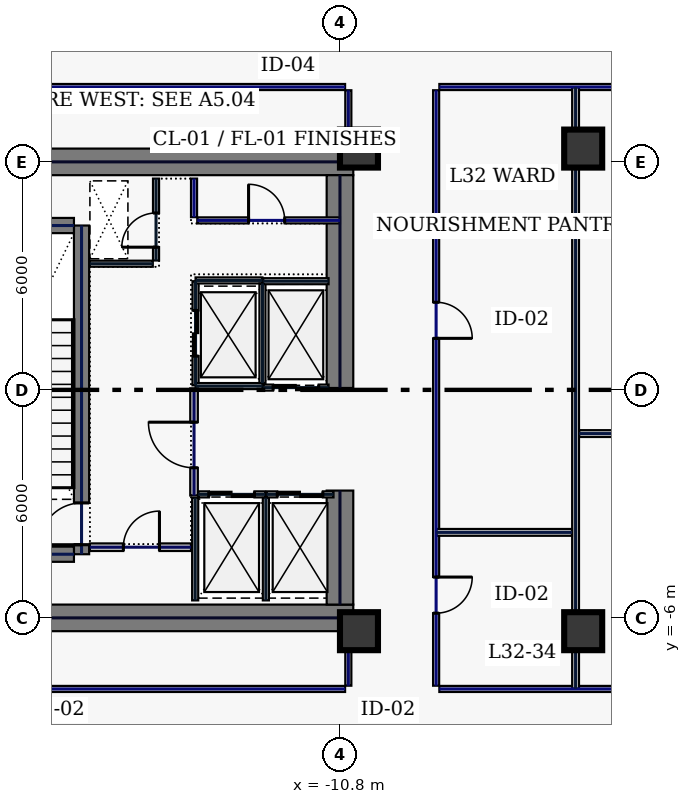
"""IFC4 building model, lengths in metres.
Left out: names, types, materials, properties, quantities, classifications, styles, units other than length and angle.
Written with IfcOpenShell. Run it as: python <this file> out.ifc"""

import sys

from ifc_helpers import new_model, si_unit, direction, frame, frame_2d, origin, origin_2d, place, context, subcontext, project, spatial, rectangle, hollow_rectangle, extrude, element, fill, save


model = new_model("IFC4")
c1 = context("Model", 3, precision=1e-05, world=origin(), true_north=direction((0.0, 1.0)))
c2 = subcontext(c1, "Body", "Model", "MODEL_VIEW")
j1 = project(units=[si_unit("LENGTHUNIT", "METRE"), si_unit("PLANEANGLEUNIT", "RADIAN")], contexts=[c1])
p1 = place(None, origin())
s1 = spatial("IfcSite", under=j1, at=p1, CompositionType="ELEMENT")
p2 = place(p1, origin())
s2 = spatial("IfcBuilding", under=s1, at=p2, CompositionType="ELEMENT")
p3 = place(p2, frame((0.0, 0.0, 141.4)))
s3 = spatial("IfcBuildingStorey", under=s2, at=p3, CompositionType="ELEMENT", Elevation=141.4)
for number, where, z_axis, x_axis in (
    (1, (-22.0, 6.0, 0.0), (0.0, 0.0, 1.0), (1.0, 0.0, 0.0)),
    (2, (-22.0, -6.0, 0.0), (0.0, 0.0, 1.0), (1.0, 0.0, 0.0)),
):
    element("IfcWall", number, at=place(p3, frame(where, z_axis=z_axis, x_axis=x_axis)), inside=s3, PredefinedType="SHEAR", context=c2, shape_type="SweptSolid", body=[
        extrude(rectangle(XDim=11.55, YDim=0.7, at=frame_2d((5.775, 0.0))), origin(), (0.0, 0.0, 1.0), 4.48),
    ])
p4 = place(p3, frame((-10.8, -5.65, 0.0), z_axis=(0.0, 0.0, 1.0), x_axis=(0.0, 1.0, 0.0)))
e3 = element("IfcWall", 3, at=p4, inside=s3, PredefinedType="SHEAR", context=c2, shape_type="SweptSolid", body=[
    extrude(rectangle(XDim=3.0, YDim=0.7, at=frame_2d((1.5, 0.0))), origin(), (0.0, 0.0, 1.0), 4.48),
])
p5 = place(p3, frame((-10.8, 0.05, 0.0), z_axis=(0.0, 0.0, 1.0), x_axis=(0.0, 1.0, 0.0)))
e4 = element("IfcWall", 4, at=p5, inside=s3, PredefinedType="SHEAR", context=c2, shape_type="SweptSolid", body=[
    extrude(rectangle(XDim=5.6, YDim=0.7, at=frame_2d((2.8, 0.0))), origin(), (0.0, 0.0, 1.0), 4.48),
])
p6 = place(p3, frame((-17.6, -4.325, 0.0), z_axis=(0.0, 0.0, 1.0), x_axis=(0.0, 1.0, 0.0)))
e5 = element("IfcWall", 5, at=p6, inside=s3, PredefinedType="SHEAR", context=c2, shape_type="SweptSolid", body=[
    extrude(rectangle(XDim=8.65, YDim=0.4, at=frame_2d((4.325, 0.0))), origin(), (0.0, 0.0, 1.0), 4.48),
])
p7 = place(p6, frame((0.25, 0.0, 0.0)))
e6 = element("IfcOpeningElement", 6, at=p7, cuts=e5, PredefinedType="OPENING", context=c2, shape_type="SweptSolid", body=[
    extrude(rectangle(XDim=1.1, YDim=2.2, at=frame_2d((0.55, 1.1))), frame((0.0, 0.21, 0.0), z_axis=(0.0, -1.0, 0.0), x_axis=(1.0, 0.0, 0.0)), (0.0, 0.0, 1.0), 0.42),
])
for number, where, z_axis, x_axis in (
    (7, (-21.2, -4.325, 0.0), (0.0, 0.0, 1.0), (1.0, 0.0, 0.0)),
    (8, (-21.2, 4.325, 0.0), (0.0, 0.0, 1.0), (1.0, 0.0, 0.0)),
):
    element("IfcWall", number, at=place(p3, frame(where, z_axis=z_axis, x_axis=x_axis)), inside=s3, PredefinedType="SHEAR", context=c2, shape_type="SweptSolid", body=[
        extrude(rectangle(XDim=3.4, YDim=0.4, at=frame_2d((1.7, 0.0))), origin(), (0.0, 0.0, 1.0), 4.48),
    ])
for number, where, z_axis, x_axis in (
    (9, (-10.3, -6.35, 0.0), (0.0, 0.0, 1.0), (1.0, 0.0, 0.0)),
    (10, (-10.3, 6.35, 0.0), (0.0, 0.0, 1.0), (1.0, 0.0, 0.0)),
    (11, (-4.4, -6.35, 0.0), (0.0, 0.0, 1.0), (1.0, 0.0, 0.0)),
    (12, (-4.4, 6.35, 0.0), (0.0, 0.0, 1.0), (1.0, 0.0, 0.0)),
):
    element("IfcColumn", number, at=place(p3, frame(where, z_axis=z_axis, x_axis=x_axis)), inside=s3, PredefinedType="COLUMN", context=c2, shape_type="SweptSolid", body=[
        extrude(hollow_rectangle(XDim=1.0, YDim=1.0, WallThickness=0.045, at=origin_2d()), origin(), (0.0, 0.0, 1.0), 4.48),
    ])
p8 = place(p3, frame((-14.6, 0.12, 0.0), z_axis=(0.0, 0.0, 1.0), x_axis=(0.0, 1.0, 0.0)))
e13 = element("IfcWall", 13, at=p8, inside=s3, PredefinedType="PARTITIONING", context=c2, shape_type="SweptSolid", body=[
    extrude(rectangle(XDim=2.74, YDim=0.16, at=frame_2d((1.37, 0.0))), origin(), (0.0, 0.0, 1.0), 4.48),
])
p9 = place(p8, frame((0.77, 0.0, 0.0)))
e14 = element("IfcOpeningElement", 14, at=p9, cuts=e13, PredefinedType="OPENING", context=c2, shape_type="SweptSolid", body=[
    extrude(rectangle(XDim=1.2, YDim=2.2, at=frame_2d((0.6, 1.1))), frame((0.0, 0.09, 0.0), z_axis=(0.0, -1.0, 0.0), x_axis=(1.0, 0.0, 0.0)), (0.0, 0.0, 1.0), 0.18),
])
for number, where, z_axis, x_axis in (
    (15, (-14.6, 0.1, 0.0), (0.0, 0.0, 1.0), (1.0, 0.0, 0.0)),
    (16, (-14.6, 2.88, 0.0), (0.0, 0.0, 1.0), (1.0, 0.0, 0.0)),
):
    element("IfcWall", number, at=place(p3, frame(where, z_axis=z_axis, x_axis=x_axis)), inside=s3, PredefinedType="PARTITIONING", context=c2, shape_type="SweptSolid", body=[
        extrude(rectangle(XDim=1.76, YDim=0.16, at=frame_2d((0.88, 0.0))), origin(), (0.0, 0.0, 1.0), 4.48),
    ])
p10 = place(p3, frame((-12.84, 0.18, 0.0), z_axis=(0.0, 0.0, 1.0), x_axis=(0.0, 1.0, 0.0)))
e17 = element("IfcWall", 17, at=p10, inside=s3, PredefinedType="PARTITIONING", context=c2, shape_type="SweptSolid", body=[
    extrude(rectangle(XDim=2.62, YDim=0.16, at=frame_2d((1.31, 0.0))), origin(), (0.0, 0.0, 1.0), 4.48),
])
p11 = place(p3, frame((-14.53, -2.75, 0.0), z_axis=(0.0, 0.0, 1.0), x_axis=(1.0, 0.0, 0.0)))
e18 = element("IfcWall", 18, at=p11, inside=s3, PredefinedType="PARTITIONING", context=c2, shape_type="SweptSolid", body=[
    extrude(rectangle(XDim=1.76, YDim=0.16, at=frame_2d((0.88, 0.0))), origin(), (0.0, 0.0, 1.0), 4.48),
])
p12 = place(p11, frame((0.28, 0.0, 0.0)))
e19 = element("IfcOpeningElement", 19, at=p12, cuts=e18, PredefinedType="OPENING", context=c2, shape_type="SweptSolid", body=[
    extrude(rectangle(XDim=1.2, YDim=2.2, at=frame_2d((0.6, 1.1))), frame((0.0, 0.09, 0.0), z_axis=(0.0, -1.0, 0.0), x_axis=(1.0, 0.0, 0.0)), (0.0, 0.0, 1.0), 0.18),
])
for number, where, z_axis, x_axis in (
    (20, (-12.75, -5.54, 0.0), (0.0, 0.0, 1.0), (0.0, 1.0, 0.0)),
    (21, (-14.61, -5.54, 0.0), (0.0, 0.0, 1.0), (0.0, 1.0, 0.0)),
):
    element("IfcWall", number, at=place(p3, frame(where, z_axis=z_axis, x_axis=x_axis)), inside=s3, PredefinedType="PARTITIONING", context=c2, shape_type="SweptSolid", body=[
        extrude(rectangle(XDim=2.7, YDim=0.16, at=frame_2d((1.35, 0.0))), origin(), (0.0, 0.0, 1.0), 4.48),
    ])
p13 = place(p3, frame((-12.73, -2.75, 0.0), z_axis=(0.0, 0.0, 1.0), x_axis=(1.0, 0.0, 0.0)))
e22 = element("IfcWall", 22, at=p13, inside=s3, PredefinedType="PARTITIONING", context=c2, shape_type="SweptSolid", body=[
    extrude(rectangle(XDim=1.76, YDim=0.16, at=frame_2d((0.88, 0.0))), origin(), (0.0, 0.0, 1.0), 4.48),
])
p14 = place(p13, frame((0.28, 0.0, 0.0)))
e23 = element("IfcOpeningElement", 23, at=p14, cuts=e22, PredefinedType="OPENING", context=c2, shape_type="SweptSolid", body=[
    extrude(rectangle(XDim=1.2, YDim=2.2, at=frame_2d((0.6, 1.1))), frame((0.0, 0.09, 0.0), z_axis=(0.0, -1.0, 0.0), x_axis=(1.0, 0.0, 0.0)), (0.0, 0.0, 1.0), 0.18),
])
p15 = place(p3, frame((-12.82, 0.06, 0.0), z_axis=(0.0, 0.0, 1.0), x_axis=(1.0, 0.0, 0.0)))
e24 = element("IfcWall", 24, at=p15, inside=s3, PredefinedType="PARTITIONING", context=c2, shape_type="SweptSolid", body=[
    extrude(rectangle(XDim=1.72, YDim=0.16, at=frame_2d((0.86, 0.0))), origin(), (0.0, 0.0, 1.0), 4.48),
])
p16 = place(p15, frame((0.26, 0.0, 0.0)))
e25 = element("IfcOpeningElement", 25, at=p16, cuts=e24, PredefinedType="OPENING", context=c2, shape_type="SweptSolid", body=[
    extrude(rectangle(XDim=1.2, YDim=2.2, at=frame_2d((0.6, 1.1))), frame((0.0, 0.09, 0.0), z_axis=(0.0, -1.0, 0.0), x_axis=(1.0, 0.0, 0.0)), (0.0, 0.0, 1.0), 0.18),
])
p17 = place(p3, frame((-12.82, 2.86, 0.0), z_axis=(0.0, 0.0, 1.0), x_axis=(1.0, 0.0, 0.0)))
e26 = element("IfcWall", 26, at=p17, inside=s3, PredefinedType="PARTITIONING", context=c2, shape_type="SweptSolid", body=[
    extrude(rectangle(XDim=1.72, YDim=0.16, at=frame_2d((0.86, 0.0))), origin(), (0.0, 0.0, 1.0), 4.48),
])
p18 = place(p3, frame((-15.64, 3.405, 0.0), z_axis=(0.0, 0.0, 1.0), x_axis=(0.0, 1.0, 0.0)))
e27 = element("IfcWall", 27, at=p18, inside=s3, PredefinedType="PARTITIONING", context=c2, shape_type="SweptSolid", body=[
    extrude(rectangle(XDim=2.155, YDim=0.16, at=frame_2d((1.078, 0.0))), origin(), (0.0, 0.0, 1.0), 4.48),
])
p19 = place(p18, frame((0.35, 0.0, 0.0)))
e28 = element("IfcOpeningElement", 28, at=p19, cuts=e27, PredefinedType="OPENING", context=c2, shape_type="SweptSolid", body=[
    extrude(rectangle(XDim=0.9, YDim=2.2, at=frame_2d((0.45, 1.1))), frame((0.0, 0.09, 0.0), z_axis=(0.0, -1.0, 0.0), x_axis=(1.0, 0.0, 0.0)), (0.0, 0.0, 1.0), 0.18),
])
p20 = place(p3, frame((-17.38, 3.32, 0.0), z_axis=(0.0, 0.0, 1.0), x_axis=(1.0, 0.0, 0.0)))
e29 = element("IfcWall", 29, at=p20, inside=s3, PredefinedType="PARTITIONING", context=c2, shape_type="SweptSolid", body=[
    extrude(rectangle(XDim=1.655, YDim=0.16, at=frame_2d((0.827, 0.0))), origin(), (0.0, 0.0, 1.0), 4.48),
])
p21 = place(p3, frame((-17.38, -4.14, 0.0), z_axis=(0.0, 0.0, 1.0), x_axis=(1.0, 0.0, 0.0)))
e30 = element("IfcWall", 30, at=p21, inside=s3, PredefinedType="SOLIDWALL", context=c2, shape_type="SweptSolid", body=[
    extrude(rectangle(XDim=2.66, YDim=0.2, at=frame_2d((1.33, 0.0))), origin(), (0.0, 0.0, 1.0), 4.48),
])
p22 = place(p21, frame((0.88, 0.0, 0.0)))
e31 = element("IfcOpeningElement", 31, at=p22, cuts=e30, PredefinedType="OPENING", context=c2, shape_type="SweptSolid", body=[
    extrude(rectangle(XDim=0.95, YDim=2.2, at=frame_2d((0.475, 1.1))), frame((0.0, 0.11, 0.0), z_axis=(0.0, -1.0, 0.0), x_axis=(1.0, 0.0, 0.0)), (0.0, 0.0, 1.0), 0.22),
])
p23 = place(p3, frame((-14.555, 4.46, 0.0), z_axis=(0.0, 0.0, 1.0), x_axis=(1.0, 0.0, 0.0)))
e32 = element("IfcWall", 32, at=p23, inside=s3, PredefinedType="PARTITIONING", context=c2, shape_type="SweptSolid", body=[
    extrude(rectangle(XDim=3.755, YDim=0.16, at=frame_2d((1.877, 0.0))), origin(), (0.0, 0.0, 1.0), 4.48),
])
p24 = place(p23, frame((1.35, 0.0, 0.0)))
e33 = element("IfcOpeningElement", 33, at=p24, cuts=e32, PredefinedType="OPENING", context=c2, shape_type="SweptSolid", body=[
    extrude(rectangle(XDim=0.95, YDim=2.2, at=frame_2d((0.475, 1.1))), frame((0.0, 0.09, 0.0), z_axis=(0.0, -1.0, 0.0), x_axis=(1.0, 0.0, 0.0)), (0.0, 0.0, 1.0), 0.18),
])
p25 = place(p3, frame((-14.64, 4.545, 0.0), z_axis=(0.0, 0.0, 1.0), x_axis=(0.0, 1.0, 0.0)))
e34 = element("IfcWall", 34, at=p25, inside=s3, PredefinedType="PARTITIONING", context=c2, shape_type="SweptSolid", body=[
    extrude(rectangle(XDim=1.015, YDim=0.16, at=frame_2d((0.508, 0.0))), origin(), (0.0, 0.0, 1.0), 4.48),
])
p26 = place(p3, frame((-14.64, -2.78, 0.0), z_axis=(0.0, 0.0, 1.0), x_axis=(0.0, 1.0, 0.0)))
e35 = element("IfcWall", 35, at=p26, inside=s3, PredefinedType="SOLIDWALL", context=c2, shape_type="SweptSolid", body=[
    extrude(rectangle(XDim=2.82, YDim=0.2, at=frame_2d((1.41, 0.0))), origin(), (0.0, 0.0, 1.0), 4.48),
])
p27 = place(p26, frame((0.73, 0.0, 0.0)))
e36 = element("IfcOpeningElement", 36, at=p27, cuts=e35, PredefinedType="OPENING", context=c2, shape_type="SweptSolid", body=[
    extrude(rectangle(XDim=1.2, YDim=2.2, at=frame_2d((0.6, 1.1))), frame((0.0, 0.11, 0.0), z_axis=(0.0, -1.0, 0.0), x_axis=(1.0, 0.0, 0.0)), (0.0, 0.0, 1.0), 0.22),
])
p28 = place(p3, frame((8.185, 7.97, 0.0), z_axis=(0.0, 0.0, 1.0), x_axis=(-1.0, 0.0, 0.0)))
e37 = element("IfcWall", 37, at=p28, inside=s3, PredefinedType="PARTITIONING", context=c2, shape_type="SweptSolid", body=[
    extrude(rectangle(XDim=16.37, YDim=0.16, at=frame_2d((8.185, 0.0))), origin(), (0.0, 0.0, 1.0), 4.48),
])
p29 = place(p28, frame((7.795, 0.0, 0.0)))
e38 = element("IfcOpeningElement", 38, at=p29, cuts=e37, PredefinedType="OPENING", context=c2, shape_type="SweptSolid", body=[
    extrude(rectangle(XDim=0.95, YDim=2.2, at=frame_2d((0.475, 1.1))), frame((0.0, 0.09, 0.0), z_axis=(0.0, -1.0, 0.0), x_axis=(1.0, 0.0, 0.0)), (0.0, 0.0, 1.0), 0.18),
])
p30 = place(p3, frame((-8.27, 7.885, 0.0), z_axis=(0.0, 0.0, 1.0), x_axis=(0.0, -1.0, 0.0)))
e39 = element("IfcWall", 39, at=p30, inside=s3, PredefinedType="PARTITIONING", context=c2, shape_type="SweptSolid", body=[
    extrude(rectangle(XDim=15.67, YDim=0.16, at=frame_2d((7.835, 0.0))), origin(), (0.0, 0.0, 1.0), 4.48),
])
p31 = place(p30, frame((12.811, 0.0, 0.0)))
e40 = element("IfcOpeningElement", 40, at=p31, cuts=e39, PredefinedType="OPENING", context=c2, shape_type="SweptSolid", body=[
    extrude(rectangle(XDim=0.95, YDim=2.2, at=frame_2d((0.475, 1.1))), frame((0.0, 0.09, 0.0), z_axis=(0.0, -1.0, 0.0), x_axis=(1.0, 0.0, 0.0)), (0.0, 0.0, 1.0), 0.18),
])
p32 = place(p30, frame((5.579, 0.0, 0.0)))
e41 = element("IfcOpeningElement", 41, at=p32, cuts=e39, PredefinedType="OPENING", context=c2, shape_type="SweptSolid", body=[
    extrude(rectangle(XDim=0.95, YDim=2.2, at=frame_2d((0.475, 1.1))), frame((0.0, 0.09, 0.0), z_axis=(0.0, -1.0, 0.0), x_axis=(1.0, 0.0, 0.0)), (0.0, 0.0, 1.0), 0.18),
])
p33 = place(p3, frame((-8.185, -7.87, 0.0), z_axis=(0.0, 0.0, 1.0), x_axis=(1.0, 0.0, 0.0)))
e42 = element("IfcWall", 42, at=p33, inside=s3, PredefinedType="PARTITIONING", context=c2, shape_type="SweptSolid", body=[
    extrude(rectangle(XDim=16.37, YDim=0.16, at=frame_2d((8.185, 0.0))), origin(), (0.0, 0.0, 1.0), 4.48),
])
p34 = place(p33, frame((7.795, 0.0, 0.0)))
e43 = element("IfcOpeningElement", 43, at=p34, cuts=e42, PredefinedType="OPENING", context=c2, shape_type="SweptSolid", body=[
    extrude(rectangle(XDim=0.95, YDim=2.2, at=frame_2d((0.475, 1.1))), frame((0.0, 0.09, 0.0), z_axis=(0.0, -1.0, 0.0), x_axis=(1.0, 0.0, 0.0)), (0.0, 0.0, 1.0), 0.18),
])
p35 = place(p3, frame((-10.58, -7.785, 0.0), z_axis=(0.0, 0.0, 1.0), x_axis=(0.0, 1.0, 0.0)))
e44 = element("IfcWall", 44, at=p35, inside=s3, PredefinedType="PARTITIONING", context=c2, shape_type="SweptSolid", body=[
    extrude(rectangle(XDim=1.365, YDim=0.16, at=frame_2d((0.683, 0.0))), origin(), (0.0, 0.0, 1.0), 2.275),
])
p36 = place(p3, frame((-10.58, 6.42, 0.0), z_axis=(0.0, 0.0, 1.0), x_axis=(0.0, 1.0, 0.0)))
e45 = element("IfcWall", 45, at=p36, inside=s3, PredefinedType="PARTITIONING", context=c2, shape_type="SweptSolid", body=[
    extrude(rectangle(XDim=1.465, YDim=0.16, at=frame_2d((0.732, 0.0))), origin(), (0.0, 0.0, 1.0), 2.275),
])
for number, where, z_axis, x_axis in (
    (46, (-10.665, 7.97, 0.0), (0.0, 0.0, 1.0), (-1.0, 0.0, 0.0)),
    (47, (-25.235, -7.87, 0.0), (0.0, 0.0, 1.0), (1.0, 0.0, 0.0)),
):
    element("IfcWall", number, at=place(p3, frame(where, z_axis=z_axis, x_axis=x_axis)), inside=s3, PredefinedType="PARTITIONING", context=c2, shape_type="SweptSolid", body=[
        extrude(rectangle(XDim=14.57, YDim=0.16, at=frame_2d((7.285, 0.0))), origin(), (0.0, 0.0, 1.0), 4.48),
    ])
p37 = place(p3, frame((-4.6, -7.865, 0.0), z_axis=(0.0, 0.0, 1.0), x_axis=(0.0, 1.0, 0.0)))
e48 = element("IfcWall", 48, at=p37, inside=s3, PredefinedType="PARTITIONING", context=c2, shape_type="SweptSolid", body=[
    extrude(rectangle(XDim=15.83, YDim=0.18, at=frame_2d((7.915, 0.0))), origin(), (0.0, 0.0, 1.0), 2.275),
])
p38 = place(p3, frame((-4.505, -1.15, 0.0), z_axis=(0.0, 0.0, 1.0), x_axis=(1.0, 0.0, 0.0)))
e49 = element("IfcWall", 49, at=p38, inside=s3, PredefinedType="PARTITIONING", context=c2, shape_type="SweptSolid", body=[
    extrude(rectangle(XDim=9.01, YDim=0.18, at=frame_2d((4.505, 0.0))), origin(), (0.0, 0.0, 1.0), 4.48),
])
p39 = place(p3, frame((-8.265, -3.75, 0.0), z_axis=(0.0, 0.0, 1.0), x_axis=(1.0, 0.0, 0.0)))
e50 = element("IfcWall", 50, at=p39, inside=s3, PredefinedType="PARTITIONING", context=c2, shape_type="SweptSolid", body=[
    extrude(rectangle(XDim=3.57, YDim=0.18, at=frame_2d((1.785, 0.0))), origin(), (0.0, 0.0, 1.0), 4.48),
])
p40 = place(p7, origin())
e51 = element("IfcDoor", 51, at=p40, inside=s3, OperationType="SINGLE_SWING_LEFT", PredefinedType="DOOR", context=c2, shape_type="SweptSolid", body=[
    extrude(rectangle(XDim=1.1, YDim=2.2, at=frame_2d((0.55, 1.1))), frame((0.0, 0.025, 0.0), z_axis=(0.0, -1.0, 0.0), x_axis=(1.0, 0.0, 0.0)), (0.0, 0.0, 1.0), 0.05),
])
fill(e6, e51)
p41 = place(p9, origin())
e52 = element("IfcDoor", 52, at=p41, inside=s3, OperationType="SLIDING_TO_LEFT", PredefinedType="DOOR", context=c2, shape_type="SweptSolid", body=[
    extrude(rectangle(XDim=1.2, YDim=2.2, at=frame_2d((0.6, 1.1))), frame((0.0, 0.025, 0.0), z_axis=(0.0, -1.0, 0.0), x_axis=(1.0, 0.0, 0.0)), (0.0, 0.0, 1.0), 0.05),
])
fill(e14, e52)
p42 = place(p12, origin())
e53 = element("IfcDoor", 53, at=p42, inside=s3, OperationType="SLIDING_TO_LEFT", PredefinedType="DOOR", context=c2, shape_type="SweptSolid", body=[
    extrude(rectangle(XDim=1.2, YDim=2.2, at=frame_2d((0.6, 1.1))), frame((0.0, 0.025, 0.0), z_axis=(0.0, -1.0, 0.0), x_axis=(1.0, 0.0, 0.0)), (0.0, 0.0, 1.0), 0.05),
])
fill(e19, e53)
p43 = place(p14, origin())
e54 = element("IfcDoor", 54, at=p43, inside=s3, OperationType="SLIDING_TO_LEFT", PredefinedType="DOOR", context=c2, shape_type="SweptSolid", body=[
    extrude(rectangle(XDim=1.2, YDim=2.2, at=frame_2d((0.6, 1.1))), frame((0.0, 0.025, 0.0), z_axis=(0.0, -1.0, 0.0), x_axis=(1.0, 0.0, 0.0)), (0.0, 0.0, 1.0), 0.05),
])
fill(e23, e54)
p44 = place(p16, origin())
e55 = element("IfcDoor", 55, at=p44, inside=s3, OperationType="SLIDING_TO_LEFT", PredefinedType="DOOR", context=c2, shape_type="SweptSolid", body=[
    extrude(rectangle(XDim=1.2, YDim=2.2, at=frame_2d((0.6, 1.1))), frame((0.0, 0.025, 0.0), z_axis=(0.0, -1.0, 0.0), x_axis=(1.0, 0.0, 0.0)), (0.0, 0.0, 1.0), 0.05),
])
fill(e25, e55)
p45 = place(p19, origin())
e56 = element("IfcDoor", 56, at=p45, inside=s3, OperationType="SINGLE_SWING_LEFT", PredefinedType="DOOR", context=c2, shape_type="SweptSolid", body=[
    extrude(rectangle(XDim=0.9, YDim=2.2, at=frame_2d((0.45, 1.1))), frame((0.0, 0.025, 0.0), z_axis=(0.0, -1.0, 0.0), x_axis=(1.0, 0.0, 0.0)), (0.0, 0.0, 1.0), 0.05),
])
fill(e28, e56)
p46 = place(p22, origin())
e57 = element("IfcDoor", 57, at=p46, inside=s3, OperationType="SINGLE_SWING_RIGHT", PredefinedType="DOOR", context=c2, shape_type="SweptSolid", body=[
    extrude(rectangle(XDim=0.95, YDim=2.2, at=frame_2d((0.475, 1.1))), frame((0.0, 0.025, 0.0), z_axis=(0.0, -1.0, 0.0), x_axis=(1.0, 0.0, 0.0)), (0.0, 0.0, 1.0), 0.05),
])
fill(e31, e57)
p47 = place(p24, origin())
e58 = element("IfcDoor", 58, at=p47, inside=s3, OperationType="SINGLE_SWING_LEFT", PredefinedType="DOOR", context=c2, shape_type="SweptSolid", body=[
    extrude(rectangle(XDim=0.95, YDim=2.2, at=frame_2d((0.475, 1.1))), frame((0.0, 0.025, 0.0), z_axis=(0.0, -1.0, 0.0), x_axis=(1.0, 0.0, 0.0)), (0.0, 0.0, 1.0), 0.05),
])
fill(e33, e58)
p48 = place(p27, origin())
e59 = element("IfcDoor", 59, at=p48, inside=s3, OperationType="SINGLE_SWING_RIGHT", PredefinedType="DOOR", context=c2, shape_type="SweptSolid", body=[
    extrude(rectangle(XDim=1.2, YDim=2.2, at=frame_2d((0.6, 1.1))), frame((0.0, 0.025, 0.0), z_axis=(0.0, -1.0, 0.0), x_axis=(1.0, 0.0, 0.0)), (0.0, 0.0, 1.0), 0.05),
])
fill(e36, e59)
p49 = place(p31, origin())
e60 = element("IfcDoor", 60, at=p49, inside=s3, OperationType="SINGLE_SWING_LEFT", PredefinedType="DOOR", context=c2, shape_type="SweptSolid", body=[
    extrude(rectangle(XDim=0.95, YDim=2.2, at=frame_2d((0.475, 1.1))), frame((0.0, 0.025, 0.0), z_axis=(0.0, -1.0, 0.0), x_axis=(1.0, 0.0, 0.0)), (0.0, 0.0, 1.0), 0.05),
])
fill(e40, e60)
p50 = place(p32, origin())
e61 = element("IfcDoor", 61, at=p50, inside=s3, OperationType="SINGLE_SWING_RIGHT", PredefinedType="DOOR", context=c2, shape_type="SweptSolid", body=[
    extrude(rectangle(XDim=0.95, YDim=2.2, at=frame_2d((0.475, 1.1))), frame((0.0, 0.025, 0.0), z_axis=(0.0, -1.0, 0.0), x_axis=(1.0, 0.0, 0.0)), (0.0, 0.0, 1.0), 0.05),
])
fill(e41, e61)
save(model, sys.argv[1])
